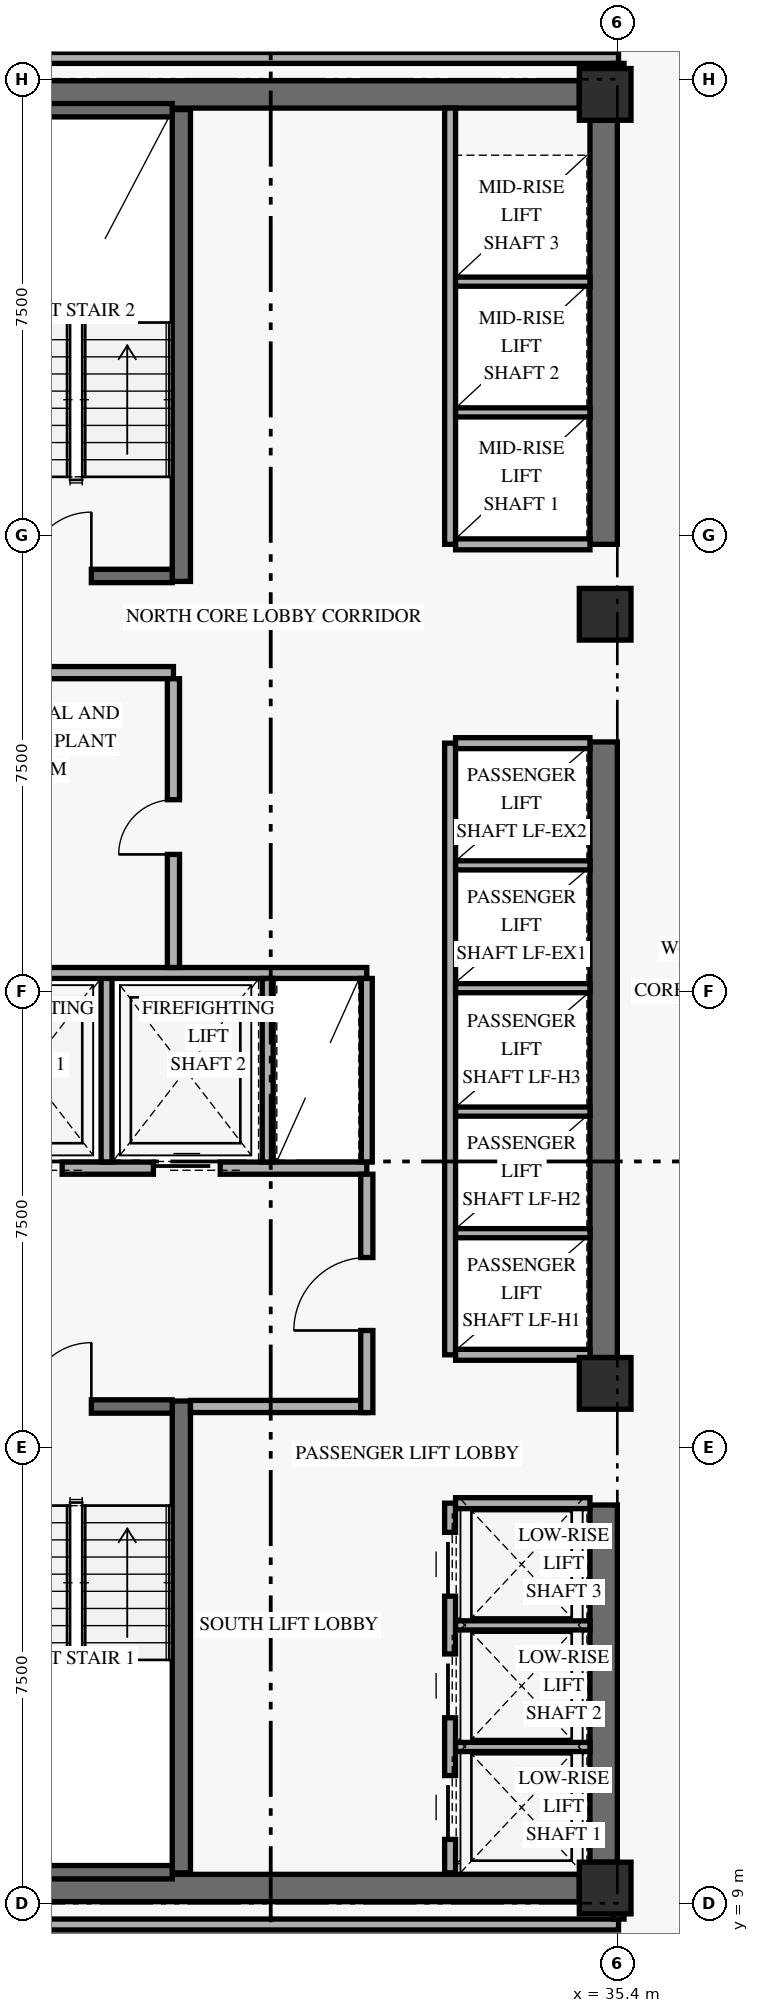
"""IFC4 building model, lengths in metres.
Left out: names, types, materials, properties, quantities, classifications, styles, units other than length and angle.
Written with IfcOpenShell. Run it as: python <this file> out.ifc"""

import sys

from ifc_helpers import new_model, si_unit, direction, frame, frame_2d, origin, origin_2d, place, context, subcontext, project, spatial, rectangle, extrude, element, fill, save


model = new_model("IFC4")
c1 = context("Model", 3, precision=1e-05, world=origin(), true_north=direction((0.0, 1.0)))
c2 = subcontext(c1, "Body", "Model", "MODEL_VIEW")
j1 = project(units=[si_unit("LENGTHUNIT", "METRE"), si_unit("PLANEANGLEUNIT", "RADIAN")], contexts=[c1])
p1 = place(None, origin())
s1 = spatial("IfcSite", under=j1, at=p1, CompositionType="ELEMENT")
p2 = place(p1, origin())
s2 = spatial("IfcBuilding", under=s1, at=p2, CompositionType="ELEMENT")
p3 = place(p2, frame((0.0, 0.0, 34.8)))
s3 = spatial("IfcBuildingStorey", under=s2, at=p3, CompositionType="ELEMENT", Elevation=34.8)
p4 = place(p3, frame((35.175, 9.675, 0.0), z_axis=(0.0, 0.0, 1.0), x_axis=(0.0, 1.0, 0.0)))
e1 = element("IfcWall", 1, at=p4, inside=s3, PredefinedType="SHEAR", context=c2, shape_type="SweptSolid", body=[
    extrude(rectangle(XDim=5.875, YDim=0.45, at=frame_2d((2.938, 0.0))), origin(), (0.0, 0.0, 1.0), 2.667),
])
p5 = place(p3, frame((35.175, 17.975, 0.0), z_axis=(0.0, 0.0, 1.0), x_axis=(0.0, 1.0, 0.0)))
e2 = element("IfcWall", 2, at=p5, inside=s3, PredefinedType="SHEAR", context=c2, shape_type="SweptSolid", body=[
    extrude(rectangle(XDim=10.125, YDim=0.45, at=frame_2d((5.062, 0.0))), origin(), (0.0, 0.0, 1.0), 2.667),
])
p6 = place(p3, frame((35.175, 31.35, 0.0), z_axis=(0.0, 0.0, 1.0), x_axis=(0.0, 1.0, 0.0)))
e3 = element("IfcWall", 3, at=p6, inside=s3, PredefinedType="SHEAR", context=c2, shape_type="SweptSolid", body=[
    extrude(rectangle(XDim=6.975, YDim=0.45, at=frame_2d((3.487, 0.0))), origin(), (0.0, 0.0, 1.0), 2.667),
])
for number, where, z_axis, x_axis in (
    (4, (24.625, 9.25, 0.0), (0.0, 0.0, 1.0), (1.0, 0.0, 0.0)),
    (5, (24.625, 38.75, 0.0), (0.0, 0.0, 1.0), (1.0, 0.0, 0.0)),
):
    element("IfcWall", number, at=place(p3, frame(where, z_axis=z_axis, x_axis=x_axis)), inside=s3, PredefinedType="SHEAR", context=c2, shape_type="SweptSolid", body=[
        extrude(rectangle(XDim=10.15, YDim=0.45, at=frame_2d((5.075, 0.0))), origin(), (0.0, 0.0, 1.0), 3.36),
    ])
p7 = place(p3, frame((28.23, 9.5, 0.0), z_axis=(0.0, 0.0, 1.0), x_axis=(0.0, 1.0, 0.0)))
e6 = element("IfcWall", 6, at=p7, inside=s3, PredefinedType="SHEAR", context=c2, shape_type="SweptSolid", body=[
    extrude(rectangle(XDim=7.76, YDim=0.3, at=frame_2d((3.88, 0.0))), origin(), (0.0, 0.0, 1.0), 3.36),
])
p8 = place(p3, frame((24.92, 9.51, 0.0), z_axis=(0.0, 0.0, 1.0), x_axis=(1.0, 0.0, 0.0)))
e7 = element("IfcWall", 7, at=p8, inside=s3, PredefinedType="SHEAR", context=c2, shape_type="SweptSolid", body=[
    extrude(rectangle(XDim=3.16, YDim=0.22, at=frame_2d((1.58, 0.0))), origin(), (0.0, 0.0, 1.0), 3.36),
])
p9 = place(p3, frame((24.92, 17.17, 0.0), z_axis=(0.0, 0.0, 1.0), x_axis=(1.0, 0.0, 0.0)))
e8 = element("IfcWall", 8, at=p9, inside=s3, PredefinedType="SHEAR", context=c2, shape_type="SweptSolid", body=[
    extrude(rectangle(XDim=3.16, YDim=0.22, at=frame_2d((1.58, 0.0))), origin(), (0.0, 0.0, 1.0), 3.36),
])
p10 = place(p9, frame((0.78, 0.0, 0.0)))
e9 = element("IfcOpeningElement", 9, at=p10, cuts=e8, PredefinedType="OPENING", context=c2, shape_type="SweptSolid", body=[
    extrude(rectangle(XDim=1.05, YDim=2.15, at=frame_2d((0.525, 1.075))), frame((0.0, 0.12, 0.0), z_axis=(0.0, -1.0, 0.0), x_axis=(1.0, 0.0, 0.0)), (0.0, 0.0, 1.0), 0.24),
])
p11 = place(p3, frame((28.23, 30.74, 0.0), z_axis=(0.0, 0.0, 1.0), x_axis=(0.0, 1.0, 0.0)))
e10 = element("IfcWall", 10, at=p11, inside=s3, PredefinedType="SHEAR", context=c2, shape_type="SweptSolid", body=[
    extrude(rectangle(XDim=7.76, YDim=0.3, at=frame_2d((3.88, 0.0))), origin(), (0.0, 0.0, 1.0), 3.36),
])
p12 = place(p3, frame((24.92, 30.83, 0.0), z_axis=(0.0, 0.0, 1.0), x_axis=(1.0, 0.0, 0.0)))
e11 = element("IfcWall", 11, at=p12, inside=s3, PredefinedType="SHEAR", context=c2, shape_type="SweptSolid", body=[
    extrude(rectangle(XDim=3.16, YDim=0.22, at=frame_2d((1.58, 0.0))), origin(), (0.0, 0.0, 1.0), 3.36),
])
p13 = place(p12, frame((0.78, 0.0, 0.0)))
e12 = element("IfcOpeningElement", 12, at=p13, cuts=e11, PredefinedType="OPENING", context=c2, shape_type="SweptSolid", body=[
    extrude(rectangle(XDim=1.05, YDim=2.15, at=frame_2d((0.525, 1.075))), frame((0.0, 0.12, 0.0), z_axis=(0.0, -1.0, 0.0), x_axis=(1.0, 0.0, 0.0)), (0.0, 0.0, 1.0), 0.24),
])
p14 = place(p3, frame((24.92, 38.49, 0.0), z_axis=(0.0, 0.0, 1.0), x_axis=(1.0, 0.0, 0.0)))
e13 = element("IfcWall", 13, at=p14, inside=s3, PredefinedType="SHEAR", context=c2, shape_type="SweptSolid", body=[
    extrude(rectangle(XDim=3.16, YDim=0.22, at=frame_2d((1.58, 0.0))), origin(), (0.0, 0.0, 1.0), 3.36),
])
for number, where, z_axis, x_axis in (
    (14, (35.2, 9.25, 0.0), (0.0, 0.0, 1.0), (1.0, 0.0, 0.0)),
    (15, (35.2, 17.55, 0.0), (0.0, 0.0, 1.0), (1.0, 0.0, 0.0)),
    (16, (35.2, 30.2, 0.0), (0.0, 0.0, 1.0), (1.0, 0.0, 0.0)),
    (17, (35.2, 38.75, 0.0), (0.0, 0.0, 1.0), (1.0, 0.0, 0.0)),
):
    element("IfcColumn", number, at=place(p3, frame(where, z_axis=z_axis, x_axis=x_axis)), inside=s3, PredefinedType="COLUMN", context=c2, shape_type="SweptSolid", body=[
        extrude(rectangle(XDim=0.85, YDim=0.85, at=origin_2d()), origin(), (0.0, 0.0, 1.0), 3.6),
    ])
p15 = place(p3, frame((24.45, 21.09, 0.0), z_axis=(0.0, 0.0, 1.0), x_axis=(1.0, 0.0, 0.0)))
e18 = element("IfcWall", 18, at=p15, inside=s3, PredefinedType="STANDARD", context=c2, shape_type="SweptSolid", body=[
    extrude(rectangle(XDim=6.83, YDim=0.2, at=frame_2d((3.415, 0.0))), origin(), (0.0, 0.0, 1.0), 3.36),
])
p16 = place(p15, frame((0.72, 0.0, 0.0)))
e19 = element("IfcOpeningElement", 19, at=p16, cuts=e18, PredefinedType="OPENING", context=c2, shape_type="SweptSolid", body=[
    extrude(rectangle(XDim=1.1, YDim=2.2, at=frame_2d((0.55, 1.1))), frame((0.0, 0.11, 0.0), z_axis=(0.0, -1.0, 0.0), x_axis=(1.0, 0.0, 0.0)), (0.0, 0.0, 1.0), 0.22),
])
p17 = place(p15, frame((3.32, 0.0, 0.0)))
e20 = element("IfcOpeningElement", 20, at=p17, cuts=e18, PredefinedType="OPENING", context=c2, shape_type="SweptSolid", body=[
    extrude(rectangle(XDim=1.1, YDim=2.2, at=frame_2d((0.55, 1.1))), frame((0.0, 0.11, 0.0), z_axis=(0.0, -1.0, 0.0), x_axis=(1.0, 0.0, 0.0)), (0.0, 0.0, 1.0), 0.22),
])
p18 = place(p3, frame((28.38, 17.17, 0.0), z_axis=(0.0, 0.0, 1.0), x_axis=(1.0, 0.0, 0.0)))
e21 = element("IfcWall", 21, at=p18, inside=s3, PredefinedType="STANDARD", context=c2, shape_type="SweptSolid", body=[
    extrude(rectangle(XDim=2.9, YDim=0.2, at=frame_2d((1.45, 0.0))), origin(), (0.0, 0.0, 1.0), 3.36),
])
p19 = place(p3, frame((31.28, 17.07, 0.0), z_axis=(0.0, 0.0, 1.0), x_axis=(0.0, 1.0, 0.0)))
e22 = element("IfcWall", 22, at=p19, inside=s3, PredefinedType="STANDARD", context=c2, shape_type="SweptSolid", body=[
    extrude(rectangle(XDim=3.92, YDim=0.2, at=frame_2d((1.96, 0.0))), origin(), (0.0, 0.0, 1.0), 2.649),
])
p20 = place(p19, frame((1.35, 0.0, 0.0)))
e23 = element("IfcOpeningElement", 23, at=p20, cuts=e22, PredefinedType="OPENING", context=c2, shape_type="SweptSolid", body=[
    extrude(rectangle(XDim=1.2, YDim=2.15, at=frame_2d((0.6, 1.075))), frame((0.0, 0.11, 0.0), z_axis=(0.0, -1.0, 0.0), x_axis=(1.0, 0.0, 0.0)), (0.0, 0.0, 1.0), 0.22),
])
p21 = place(p3, frame((27.0, 21.19, 0.0), z_axis=(0.0, 0.0, 1.0), x_axis=(0.0, 1.0, 0.0)))
e24 = element("IfcWall", 24, at=p21, inside=s3, PredefinedType="STANDARD", context=c2, shape_type="SweptSolid", body=[
    extrude(rectangle(XDim=3.11, YDim=0.18, at=frame_2d((1.555, 0.0))), origin(), (0.0, 0.0, 1.0), 3.36),
])
p22 = place(p3, frame((24.45, 24.3, 0.0), z_axis=(0.0, 0.0, 1.0), x_axis=(1.0, 0.0, 0.0)))
e25 = element("IfcWall", 25, at=p22, inside=s3, PredefinedType="STANDARD", context=c2, shape_type="SweptSolid", body=[
    extrude(rectangle(XDim=6.83, YDim=0.18, at=frame_2d((3.415, 0.0))), origin(), (0.0, 0.0, 1.0), 3.36),
])
for number, where, z_axis, x_axis in (
    (26, (29.65, 21.19, 0.0), (0.0, 0.0, 1.0), (0.0, 1.0, 0.0)),
    (27, (31.28, 21.19, 0.0), (0.0, 0.0, 1.0), (0.0, 1.0, 0.0)),
):
    element("IfcWall", number, at=place(p3, frame(where, z_axis=z_axis, x_axis=x_axis)), inside=s3, PredefinedType="STANDARD", context=c2, shape_type="SweptSolid", body=[
        extrude(rectangle(XDim=3.02, YDim=0.18, at=frame_2d((1.51, 0.0))), origin(), (0.0, 0.0, 1.0), 3.36),
    ])
p23 = place(p3, frame((24.45, 29.24, 0.0), z_axis=(0.0, 0.0, 1.0), x_axis=(1.0, 0.0, 0.0)))
e28 = element("IfcWall", 28, at=p23, inside=s3, PredefinedType="STANDARD", context=c2, shape_type="SweptSolid", body=[
    extrude(rectangle(XDim=3.65, YDim=0.2, at=frame_2d((1.825, 0.0))), origin(), (0.0, 0.0, 1.0), 3.36),
])
p24 = place(p3, frame((28.1, 24.39, 0.0), z_axis=(0.0, 0.0, 1.0), x_axis=(0.0, 1.0, 0.0)))
e29 = element("IfcWall", 29, at=p24, inside=s3, PredefinedType="STANDARD", context=c2, shape_type="SweptSolid", body=[
    extrude(rectangle(XDim=4.75, YDim=0.2, at=frame_2d((2.375, 0.0))), origin(), (0.0, 0.0, 1.0), 3.36),
])
p25 = place(p24, frame((1.86, 0.0, 0.0)))
e30 = element("IfcOpeningElement", 30, at=p25, cuts=e29, PredefinedType="OPENING", context=c2, shape_type="SweptSolid", body=[
    extrude(rectangle(XDim=0.9, YDim=2.1, at=frame_2d((0.45, 1.05))), frame((0.0, 0.11, 0.0), z_axis=(0.0, -1.0, 0.0), x_axis=(1.0, 0.0, 0.0)), (0.0, 0.0, 1.0), 0.22),
])
p26 = place(p3, frame((32.65, 9.5, 0.0), z_axis=(0.0, 0.0, 1.0), x_axis=(0.0, 1.0, 0.0)))
e31 = element("IfcWall", 31, at=p26, inside=s3, PredefinedType="STANDARD", context=c2, shape_type="SweptSolid", body=[
    extrude(rectangle(XDim=6.08, YDim=0.18, at=frame_2d((3.04, 0.0))), origin(), (0.0, 0.0, 1.0), 3.36),
])
p27 = place(p26, frame((0.55, 0.0, 0.0)))
e32 = element("IfcOpeningElement", 32, at=p27, cuts=e31, PredefinedType="OPENING", context=c2, shape_type="SweptSolid", body=[
    extrude(rectangle(XDim=1.05, YDim=2.2, at=frame_2d((0.525, 1.1))), frame((0.0, 0.1, 0.0), z_axis=(0.0, -1.0, 0.0), x_axis=(1.0, 0.0, 0.0)), (0.0, 0.0, 1.0), 0.2),
])
p28 = place(p26, frame((2.55, 0.0, 0.0)))
e33 = element("IfcOpeningElement", 33, at=p28, cuts=e31, PredefinedType="OPENING", context=c2, shape_type="SweptSolid", body=[
    extrude(rectangle(XDim=1.05, YDim=2.2, at=frame_2d((0.525, 1.1))), frame((0.0, 0.1, 0.0), z_axis=(0.0, -1.0, 0.0), x_axis=(1.0, 0.0, 0.0)), (0.0, 0.0, 1.0), 0.2),
])
p29 = place(p26, frame((4.55, 0.0, 0.0)))
e34 = element("IfcOpeningElement", 34, at=p29, cuts=e31, PredefinedType="OPENING", context=c2, shape_type="SweptSolid", body=[
    extrude(rectangle(XDim=1.05, YDim=2.2, at=frame_2d((0.525, 1.1))), frame((0.0, 0.1, 0.0), z_axis=(0.0, -1.0, 0.0), x_axis=(1.0, 0.0, 0.0)), (0.0, 0.0, 1.0), 0.2),
])
p30 = place(p3, frame((32.74, 15.58, 0.0), z_axis=(0.0, 0.0, 1.0), x_axis=(1.0, 0.0, 0.0)))
e35 = element("IfcWall", 35, at=p30, inside=s3, PredefinedType="STANDARD", context=c2, shape_type="SweptSolid", body=[
    extrude(rectangle(XDim=2.21, YDim=0.18, at=frame_2d((1.105, 0.0))), origin(), (0.0, 0.0, 1.0), 3.36),
])
for number, where, z_axis, x_axis in (
    (36, (32.74, 11.57, 0.0), (0.0, 0.0, 1.0), (1.0, 0.0, 0.0)),
    (37, (32.74, 13.57, 0.0), (0.0, 0.0, 1.0), (1.0, 0.0, 0.0)),
):
    element("IfcWall", number, at=place(p3, frame(where, z_axis=z_axis, x_axis=x_axis)), inside=s3, PredefinedType="STANDARD", context=c2, shape_type="SweptSolid", body=[
        extrude(rectangle(XDim=2.21, YDim=0.15, at=frame_2d((1.105, 0.0))), origin(), (0.0, 0.0, 1.0), 3.36),
    ])
p31 = place(p3, frame((32.65, 18.02, 0.0), z_axis=(0.0, 0.0, 1.0), x_axis=(0.0, 1.0, 0.0)))
e38 = element("IfcWall", 38, at=p31, inside=s3, PredefinedType="STANDARD", context=c2, shape_type="SweptSolid", body=[
    extrude(rectangle(XDim=10.06, YDim=0.18, at=frame_2d((5.03, 0.0))), origin(), (0.0, 0.0, 1.0), 3.36),
])
for number, where, z_axis, x_axis in (
    (39, (32.74, 18.02, 0.0), (0.0, 0.0, 1.0), (1.0, 0.0, 0.0)),
    (40, (32.74, 28.08, 0.0), (0.0, 0.0, 1.0), (1.0, 0.0, 0.0)),
):
    element("IfcWall", number, at=place(p3, frame(where, z_axis=z_axis, x_axis=x_axis)), inside=s3, PredefinedType="STANDARD", context=c2, shape_type="SweptSolid", body=[
        extrude(rectangle(XDim=2.21, YDim=0.18, at=frame_2d((1.105, 0.0))), origin(), (0.0, 0.0, 1.0), 3.36),
    ])
for number, where, z_axis, x_axis in (
    (41, (32.74, 20.02, 0.0), (0.0, 0.0, 1.0), (1.0, 0.0, 0.0)),
    (42, (32.74, 22.02, 0.0), (0.0, 0.0, 1.0), (1.0, 0.0, 0.0)),
    (43, (32.74, 24.05, 0.0), (0.0, 0.0, 1.0), (1.0, 0.0, 0.0)),
    (44, (32.74, 26.07, 0.0), (0.0, 0.0, 1.0), (1.0, 0.0, 0.0)),
):
    element("IfcWall", number, at=place(p3, frame(where, z_axis=z_axis, x_axis=x_axis)), inside=s3, PredefinedType="STANDARD", context=c2, shape_type="SweptSolid", body=[
        extrude(rectangle(XDim=2.21, YDim=0.15, at=frame_2d((1.105, 0.0))), origin(), (0.0, 0.0, 1.0), 3.36),
    ])
p32 = place(p3, frame((32.65, 31.35, 0.0), z_axis=(0.0, 0.0, 1.0), x_axis=(0.0, 1.0, 0.0)))
e45 = element("IfcWall", 45, at=p32, inside=s3, PredefinedType="STANDARD", context=c2, shape_type="SweptSolid", body=[
    extrude(rectangle(XDim=7.175, YDim=0.18, at=frame_2d((3.587, 0.0))), origin(), (0.0, 0.0, 1.0), 3.36),
])
p33 = place(p3, frame((32.74, 31.35, 0.0), z_axis=(0.0, 0.0, 1.0), x_axis=(1.0, 0.0, 0.0)))
e46 = element("IfcWall", 46, at=p33, inside=s3, PredefinedType="STANDARD", context=c2, shape_type="SweptSolid", body=[
    extrude(rectangle(XDim=2.21, YDim=0.18, at=frame_2d((1.105, 0.0))), origin(), (0.0, 0.0, 1.0), 3.36),
])
for number, where, z_axis, x_axis in (
    (47, (32.74, 33.52, 0.0), (0.0, 0.0, 1.0), (1.0, 0.0, 0.0)),
    (48, (32.74, 35.67, 0.0), (0.0, 0.0, 1.0), (1.0, 0.0, 0.0)),
):
    element("IfcWall", number, at=place(p3, frame(where, z_axis=z_axis, x_axis=x_axis)), inside=s3, PredefinedType="STANDARD", context=c2, shape_type="SweptSolid", body=[
        extrude(rectangle(XDim=2.21, YDim=0.15, at=frame_2d((1.105, 0.0))), origin(), (0.0, 0.0, 1.0), 3.36),
    ])
for number, where, z_axis, x_axis in (
    (49, (23.75, 8.65, 0.0), (0.0, 0.0, 1.0), (1.0, 0.0, 0.0)),
    (50, (23.75, 39.35, 0.0), (0.0, 0.0, 1.0), (1.0, 0.0, 0.0)),
):
    element("IfcWall", number, at=place(p3, frame(where, z_axis=z_axis, x_axis=x_axis)), inside=s3, PredefinedType="STANDARD", context=c2, shape_type="SweptSolid", body=[
        extrude(rectangle(XDim=11.67, YDim=0.18, at=frame_2d((5.835, 0.0))), origin(), (0.0, 0.0, 1.0), 2.649),
    ])
for number, where, z_axis, x_axis in (
    (51, (35.42, 8.74, 0.0), (0.0, 0.0, 1.0), (0.0, 1.0, 0.0)),
    (52, (35.42, 38.75, 0.0), (0.0, 0.0, 1.0), (0.0, 1.0, 0.0)),
):
    element("IfcWall", number, at=place(p3, frame(where, z_axis=z_axis, x_axis=x_axis)), inside=s3, PredefinedType="STANDARD", context=c2, shape_type="SweptSolid", body=[
        extrude(rectangle(XDim=0.51, YDim=0.18, at=frame_2d((0.255, 0.0))), origin(), (0.0, 0.0, 1.0), 3.36),
    ])
p34 = place(p10, frame((1.05, 0.0, 0.0), z_axis=(0.0, 0.0, 1.0), x_axis=(-1.0, 0.0, 0.0)))
e53 = element("IfcDoor", 53, at=p34, inside=s3, OperationType="SINGLE_SWING_LEFT", PredefinedType="DOOR", context=c2, shape_type="SweptSolid", body=[
    extrude(rectangle(XDim=1.05, YDim=2.15, at=frame_2d((0.525, 1.075))), frame((0.0, 0.025, 0.0), z_axis=(0.0, -1.0, 0.0), x_axis=(1.0, 0.0, 0.0)), (0.0, 0.0, 1.0), 0.05),
])
fill(e9, e53)
p35 = place(p13, origin())
e54 = element("IfcDoor", 54, at=p35, inside=s3, OperationType="SINGLE_SWING_RIGHT", PredefinedType="DOOR", context=c2, shape_type="SweptSolid", body=[
    extrude(rectangle(XDim=1.05, YDim=2.15, at=frame_2d((0.525, 1.075))), frame((0.0, 0.025, 0.0), z_axis=(0.0, -1.0, 0.0), x_axis=(1.0, 0.0, 0.0)), (0.0, 0.0, 1.0), 0.05),
])
fill(e12, e54)
p36 = place(p16, origin())
e55 = element("IfcDoor", 55, at=p36, inside=s3, OperationType="SLIDING_TO_LEFT", PredefinedType="DOOR", context=c2, shape_type="SweptSolid", body=[
    extrude(rectangle(XDim=1.1, YDim=2.2, at=frame_2d((0.55, 1.1))), frame((0.0, 0.025, 0.0), z_axis=(0.0, -1.0, 0.0), x_axis=(1.0, 0.0, 0.0)), (0.0, 0.0, 1.0), 0.05),
])
fill(e19, e55)
p37 = place(p17, origin())
e56 = element("IfcDoor", 56, at=p37, inside=s3, OperationType="SLIDING_TO_LEFT", PredefinedType="DOOR", context=c2, shape_type="SweptSolid", body=[
    extrude(rectangle(XDim=1.1, YDim=2.2, at=frame_2d((0.55, 1.1))), frame((0.0, 0.025, 0.0), z_axis=(0.0, -1.0, 0.0), x_axis=(1.0, 0.0, 0.0)), (0.0, 0.0, 1.0), 0.05),
])
fill(e20, e56)
p38 = place(p20, origin())
e57 = element("IfcDoor", 57, at=p38, inside=s3, OperationType="SINGLE_SWING_LEFT", PredefinedType="DOOR", context=c2, shape_type="SweptSolid", body=[
    extrude(rectangle(XDim=1.2, YDim=2.15, at=frame_2d((0.6, 1.075))), frame((0.0, 0.025, 0.0), z_axis=(0.0, -1.0, 0.0), x_axis=(1.0, 0.0, 0.0)), (0.0, 0.0, 1.0), 0.05),
])
fill(e23, e57)
p39 = place(p25, origin())
e58 = element("IfcDoor", 58, at=p39, inside=s3, OperationType="SINGLE_SWING_LEFT", PredefinedType="DOOR", context=c2, shape_type="SweptSolid", body=[
    extrude(rectangle(XDim=0.9, YDim=2.1, at=frame_2d((0.45, 1.05))), frame((0.0, 0.025, 0.0), z_axis=(0.0, -1.0, 0.0), x_axis=(1.0, 0.0, 0.0)), (0.0, 0.0, 1.0), 0.05),
])
fill(e30, e58)
p40 = place(p27, origin())
e59 = element("IfcDoor", 59, at=p40, inside=s3, OperationType="SLIDING_TO_LEFT", PredefinedType="DOOR", context=c2, shape_type="SweptSolid", body=[
    extrude(rectangle(XDim=1.05, YDim=2.2, at=frame_2d((0.525, 1.1))), frame((0.0, 0.025, 0.0), z_axis=(0.0, -1.0, 0.0), x_axis=(1.0, 0.0, 0.0)), (0.0, 0.0, 1.0), 0.05),
])
fill(e32, e59)
p41 = place(p28, origin())
e60 = element("IfcDoor", 60, at=p41, inside=s3, OperationType="SLIDING_TO_LEFT", PredefinedType="DOOR", context=c2, shape_type="SweptSolid", body=[
    extrude(rectangle(XDim=1.05, YDim=2.2, at=frame_2d((0.525, 1.1))), frame((0.0, 0.025, 0.0), z_axis=(0.0, -1.0, 0.0), x_axis=(1.0, 0.0, 0.0)), (0.0, 0.0, 1.0), 0.05),
])
fill(e33, e60)
p42 = place(p29, origin())
e61 = element("IfcDoor", 61, at=p42, inside=s3, OperationType="SLIDING_TO_LEFT", PredefinedType="DOOR", context=c2, shape_type="SweptSolid", body=[
    extrude(rectangle(XDim=1.05, YDim=2.2, at=frame_2d((0.525, 1.1))), frame((0.0, 0.025, 0.0), z_axis=(0.0, -1.0, 0.0), x_axis=(1.0, 0.0, 0.0)), (0.0, 0.0, 1.0), 0.05),
])
fill(e34, e61)
save(model, sys.argv[1])
